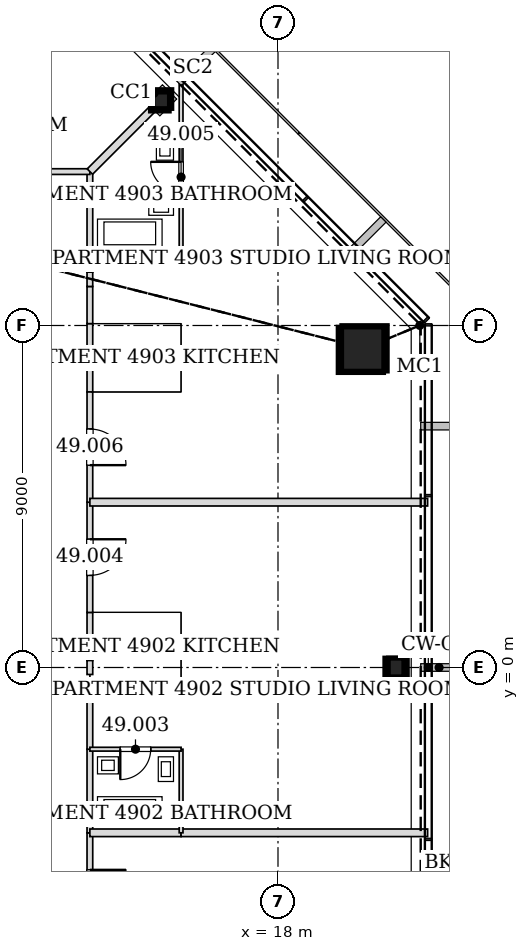
"""IFC4 building model, lengths in metres.
Left out: names, types, materials, properties, quantities, classifications, styles, units other than length and angle.
Written with IfcOpenShell. Run it as: python <this file> out.ifc"""

import sys

from ifc_helpers import new_model, si_unit, direction, frame, frame_2d, origin, origin_2d, place, context, subcontext, project, spatial, rectangle, hollow_rectangle, extrude, element, fill, save


model = new_model("IFC4")
c1 = context("Model", 3, precision=1e-05, world=origin(), true_north=direction((0.0, 1.0)))
c2 = subcontext(c1, "Body", "Model", "MODEL_VIEW")
j1 = project(units=[si_unit("LENGTHUNIT", "METRE"), si_unit("PLANEANGLEUNIT", "RADIAN")], contexts=[c1])
p1 = place(None, origin())
s1 = spatial("IfcSite", under=j1, at=p1, CompositionType="ELEMENT")
p2 = place(p1, origin())
s2 = spatial("IfcBuilding", under=s1, at=p2, CompositionType="ELEMENT")
p3 = place(p2, frame((0.0, 0.0, 214.2)))
s3 = spatial("IfcBuildingStorey", under=s2, at=p3, CompositionType="ELEMENT", Elevation=214.2)
p4 = place(p3, frame((20.277, 8.399, 0.0), z_axis=(-0.02827709807, -0.011770162649, 0.999530824435), x_axis=(0.3842825994, -0.923215513192, 0.0)))
e1 = element("IfcColumn", 1, at=p4, inside=s3, PredefinedType="COLUMN", context=c2, shape_type="SweptSolid", body=[
    extrude(hollow_rectangle(XDim=1.2, YDim=1.2, WallThickness=0.055, at=origin_2d()), origin(), (0.0, 0.0, 1.0), 3.402),
])
for number, where, z_axis, x_axis in (
    (2, (21.155, 0.0, 0.0), (-0.028, 0.0, 1.0), (0.0, -1.0, 0.0)),
    (3, (14.959, 14.959, 0.0), (-0.02, -0.02, 1.0), (0.707, -0.707, 0.0)),
):
    element("IfcColumn", number, at=place(p3, frame(where, z_axis=z_axis, x_axis=x_axis)), inside=s3, PredefinedType="COLUMN", context=c2, shape_type="SweptSolid", body=[
        extrude(hollow_rectangle(XDim=0.5, YDim=0.5, WallThickness=0.025, at=origin_2d()), origin(), (0.0, 0.0, 1.0), 3.402),
    ])
p5 = place(p3, frame((13.05, -7.251, 0.0), z_axis=(0.0, 0.0, 1.0), x_axis=(0.0, 1.0, 0.0)))
e4 = element("IfcWall", 4, at=p5, inside=s3, PredefinedType="PARTITIONING", context=c2, shape_type="SweptSolid", body=[
    extrude(rectangle(XDim=2.902, YDim=0.15, at=frame_2d((1.451, 0.0))), origin(), (0.0, 0.0, 1.0), 3.2),
])
p6 = place(p5, frame((0.976, 0.0, 0.0)))
e5 = element("IfcOpeningElement", 5, at=p6, cuts=e4, PredefinedType="OPENING", context=c2, shape_type="SweptSolid", body=[
    extrude(rectangle(XDim=0.95, YDim=2.1, at=frame_2d((0.475, 1.05))), frame((0.0, 0.085, 0.0), z_axis=(0.0, -1.0, 0.0), x_axis=(1.0, 0.0, 0.0)), (0.0, 0.0, 1.0), 0.17),
])
p7 = place(p3, frame((13.05, -4.351, 0.0), z_axis=(0.0, 0.0, 1.0), x_axis=(0.0, 1.0, 0.0)))
e6 = element("IfcWall", 6, at=p7, inside=s3, PredefinedType="PARTITIONING", context=c2, shape_type="SweptSolid", body=[
    extrude(rectangle(XDim=2.202, YDim=0.15, at=frame_2d((1.101, 0.0))), origin(), (0.0, 0.0, 1.0), 3.2),
])
p8 = place(p3, frame((13.05, 0.184, 0.0), z_axis=(0.0, 0.0, 1.0), x_axis=(0.0, 1.0, 0.0)))
e7 = element("IfcWall", 7, at=p8, inside=s3, PredefinedType="PARTITIONING", context=c2, shape_type="SweptSolid", body=[
    extrude(rectangle(XDim=1.267, YDim=0.15, at=frame_2d((0.634, 0.0))), origin(), (0.0, 0.0, 1.0), 3.2),
])
p9 = place(p3, frame((13.05, -0.184, 0.0), z_axis=(0.0, 0.0, 1.0), x_axis=(0.0, 1.0, 0.0)))
e8 = element("IfcWall", 8, at=p9, inside=s3, PredefinedType="PARTITIONING", context=c2, shape_type="SweptSolid", body=[
    extrude(rectangle(XDim=0.367, YDim=0.15, at=frame_2d((0.184, 0.0))), origin(), (0.0, 0.0, 1.0), 2.253),
])
p10 = place(p3, frame((13.05, -2.151, 0.0), z_axis=(0.0, 0.0, 1.0), x_axis=(0.0, 1.0, 0.0)))
e9 = element("IfcWall", 9, at=p10, inside=s3, PredefinedType="PARTITIONING", context=c2, shape_type="SweptSolid", body=[
    extrude(rectangle(XDim=1.802, YDim=0.15, at=frame_2d((0.901, 0.0))), origin(), (0.0, 0.0, 1.0), 3.2),
])
p11 = place(p3, frame((13.05, 1.449, 0.0), z_axis=(0.0, 0.0, 1.0), x_axis=(0.0, 1.0, 0.0)))
e10 = element("IfcWall", 10, at=p11, inside=s3, PredefinedType="PARTITIONING", context=c2, shape_type="SweptSolid", body=[
    extrude(rectangle(XDim=2.902, YDim=0.15, at=frame_2d((1.451, 0.0))), origin(), (0.0, 0.0, 1.0), 3.2),
])
p12 = place(p11, frame((0.976, 0.0, 0.0)))
e11 = element("IfcOpeningElement", 11, at=p12, cuts=e10, PredefinedType="OPENING", context=c2, shape_type="SweptSolid", body=[
    extrude(rectangle(XDim=0.95, YDim=2.1, at=frame_2d((0.475, 1.05))), frame((0.0, 0.085, 0.0), z_axis=(0.0, -1.0, 0.0), x_axis=(1.0, 0.0, 0.0)), (0.0, 0.0, 1.0), 0.17),
])
p13 = place(p3, frame((13.05, 10.849, 0.0), z_axis=(0.0, 0.0, 1.0), x_axis=(0.0, 1.0, 0.0)))
e12 = element("IfcWall", 12, at=p13, inside=s3, PredefinedType="PARTITIONING", context=c2, shape_type="SweptSolid", body=[
    extrude(rectangle(XDim=2.201, YDim=0.15, at=frame_2d((1.101, 0.0))), origin(), (0.0, 0.0, 1.0), 2.578),
])
p14 = place(p3, frame((13.05, 7.249, 0.0), z_axis=(0.0, 0.0, 1.0), x_axis=(0.0, 1.0, 0.0)))
e13 = element("IfcWall", 13, at=p14, inside=s3, PredefinedType="PARTITIONING", context=c2, shape_type="SweptSolid", body=[
    extrude(rectangle(XDim=1.802, YDim=0.15, at=frame_2d((0.901, 0.0))), origin(), (0.0, 0.0, 1.0), 3.2),
])
p15 = place(p3, frame((13.05, 4.349, 0.0), z_axis=(0.0, 0.0, 1.0), x_axis=(0.0, 1.0, 0.0)))
e14 = element("IfcWall", 14, at=p15, inside=s3, PredefinedType="PARTITIONING", context=c2, shape_type="SweptSolid", body=[
    extrude(rectangle(XDim=2.902, YDim=0.15, at=frame_2d((1.451, 0.0))), origin(), (0.0, 0.0, 1.0), 3.2),
])
p16 = place(p15, frame((0.976, 0.0, 0.0)))
e15 = element("IfcOpeningElement", 15, at=p16, cuts=e14, PredefinedType="OPENING", context=c2, shape_type="SweptSolid", body=[
    extrude(rectangle(XDim=0.95, YDim=2.1, at=frame_2d((0.475, 1.05))), frame((0.0, 0.085, 0.0), z_axis=(0.0, -1.0, 0.0), x_axis=(1.0, 0.0, 0.0)), (0.0, 0.0, 1.0), 0.17),
])
p17 = place(p3, frame((13.05, 9.049, 0.0), z_axis=(0.0, 0.0, 1.0), x_axis=(0.0, 1.0, 0.0)))
e16 = element("IfcWall", 16, at=p17, inside=s3, PredefinedType="PARTITIONING", context=c2, shape_type="SweptSolid", body=[
    extrude(rectangle(XDim=0.978, YDim=0.15, at=frame_2d((0.489, 0.0))), origin(), (0.0, 0.0, 1.0), 3.2),
])
p18 = place(p3, frame((13.05, 10.404, 0.0), z_axis=(0.0, 0.0, 1.0), x_axis=(0.0, 1.0, 0.0)))
e17 = element("IfcWall", 17, at=p18, inside=s3, PredefinedType="PARTITIONING", context=c2, shape_type="SweptSolid", body=[
    extrude(rectangle(XDim=0.447, YDim=0.15, at=frame_2d((0.224, 0.0))), origin(), (0.0, 0.0, 1.0), 3.2),
])
p19 = place(p3, frame((13.05, 10.027, 0.0), z_axis=(0.0, 0.0, 1.0), x_axis=(0.0, 1.0, 0.0)))
e18 = element("IfcWall", 18, at=p19, inside=s3, PredefinedType="PARTITIONING", context=c2, shape_type="SweptSolid", body=[
    extrude(rectangle(XDim=0.377, YDim=0.15, at=frame_2d((0.188, 0.0))), origin(), (0.0, 0.0, 1.0), 2.268),
])
p20 = place(p3, frame((13.05, 13.05, 0.0), z_axis=(0.0, 0.0, 1.0), x_axis=(-1.0, 0.0, 0.0)))
e19 = element("IfcWall", 19, at=p20, inside=s3, PredefinedType="PARTITIONING", context=c2, shape_type="SweptSolid", body=[
    extrude(rectangle(XDim=2.646, YDim=0.15, at=frame_2d((1.323, 0.0))), origin(), (0.0, 0.0, 1.0), 2.578),
])
p21 = place(p3, frame((15.451, -4.35, 0.0), z_axis=(0.0, 0.0, 1.0), x_axis=(-1.0, 0.0, 0.0)))
e20 = element("IfcWall", 20, at=p21, inside=s3, PredefinedType="PARTITIONING", context=c2, shape_type="SweptSolid", body=[
    extrude(rectangle(XDim=2.401, YDim=0.2, at=frame_2d((1.2, 0.0))), origin(), (0.0, 0.0, 1.0), 2.591),
])
p22 = place(p3, frame((21.937, -4.35, 0.0), z_axis=(0.0, 0.0, 1.0), x_axis=(-1.0, 0.0, 0.0)))
e21 = element("IfcWall", 21, at=p22, inside=s3, PredefinedType="PARTITIONING", context=c2, shape_type="SweptSolid", body=[
    extrude(rectangle(XDim=6.488, YDim=0.2, at=frame_2d((3.244, 0.0))), origin(), (0.0, 0.0, 1.0), 2.591),
])
p23 = place(p3, frame((15.45, -4.35, 0.0), z_axis=(0.0, 0.0, 1.0), x_axis=(0.0, 1.0, 0.0)))
e22 = element("IfcWall", 22, at=p23, inside=s3, PredefinedType="PARTITIONING", context=c2, shape_type="SweptSolid", body=[
    extrude(rectangle(XDim=2.2, YDim=0.1, at=frame_2d((1.1, 0.0))), origin(), (0.0, 0.0, 1.0), 3.2),
])
p24 = place(p3, frame((15.45, -2.15, 0.0), z_axis=(0.0, 0.0, 1.0), x_axis=(-1.0, 0.0, 0.0)))
e23 = element("IfcWall", 23, at=p24, inside=s3, PredefinedType="PARTITIONING", context=c2, shape_type="SweptSolid", body=[
    extrude(rectangle(XDim=2.4, YDim=0.1, at=frame_2d((1.2, 0.0))), origin(), (0.0, 0.0, 1.0), 2.591),
])
p25 = place(p24, frame((0.8, 0.0, 0.0)))
e24 = element("IfcOpeningElement", 24, at=p25, cuts=e23, PredefinedType="OPENING", context=c2, shape_type="SweptSolid", body=[
    extrude(rectangle(XDim=0.8, YDim=2.1, at=frame_2d((0.4, 1.05))), frame((0.0, 0.06, 0.0), z_axis=(0.0, -1.0, 0.0), x_axis=(1.0, 0.0, 0.0)), (0.0, 0.0, 1.0), 0.12),
])
p26 = place(p3, frame((21.937, 4.35, 0.0), z_axis=(0.0, 0.0, 1.0), x_axis=(-1.0, 0.0, 0.0)))
e25 = element("IfcWall", 25, at=p26, inside=s3, PredefinedType="PARTITIONING", context=c2, shape_type="SweptSolid", body=[
    extrude(rectangle(XDim=8.887, YDim=0.2, at=frame_2d((4.444, 0.0))), origin(), (0.0, 0.0, 1.0), 2.591),
])
p27 = place(p3, frame((13.05, 10.85, 0.0), z_axis=(0.0, 0.0, 1.0), x_axis=(1.0, 0.0, 0.0)))
e26 = element("IfcWall", 26, at=p27, inside=s3, PredefinedType="PARTITIONING", context=c2, shape_type="SweptSolid", body=[
    extrude(rectangle(XDim=2.4, YDim=0.1, at=frame_2d((1.2, 0.0))), origin(), (0.0, 0.0, 1.0), 2.74),
])
p28 = place(p3, frame((15.45, 10.85, 0.0), z_axis=(0.0, 0.0, 1.0), x_axis=(0.0, 1.0, 0.0)))
e27 = element("IfcWall", 27, at=p28, inside=s3, PredefinedType="PARTITIONING", context=c2, shape_type="SweptSolid", body=[
    extrude(rectangle(XDim=4.617, YDim=0.1, at=frame_2d((2.309, 0.0))), origin(), (0.0, 0.0, 1.0), 2.784),
])
p29 = place(p28, frame((1.656, 0.0, 0.0)))
e28 = element("IfcOpeningElement", 28, at=p29, cuts=e27, PredefinedType="OPENING", context=c2, shape_type="SweptSolid", body=[
    extrude(rectangle(XDim=0.8, YDim=2.1, at=frame_2d((0.4, 1.05))), frame((0.0, 0.06, 0.0), z_axis=(0.0, -1.0, 0.0), x_axis=(1.0, 0.0, 0.0)), (0.0, 0.0, 1.0), 0.12),
])
p30 = place(p3, frame((14.701, 14.701, 0.0), z_axis=(0.0, 0.0, 1.0), x_axis=(-0.707106781187, -0.707106781187, 0.0)))
e29 = element("IfcWall", 29, at=p30, inside=s3, PredefinedType="PARTITIONING", context=c2, shape_type="SweptSolid", body=[
    extrude(rectangle(XDim=2.334, YDim=0.2, at=frame_2d((1.167, 0.0))), origin(), (0.0, 0.0, 1.0), 2.578),
])
p31 = place(p6, frame((0.95, 0.0, 0.0), z_axis=(0.0, 0.0, 1.0), x_axis=(-1.0, 0.0, 0.0)))
e30 = element("IfcDoor", 30, at=p31, inside=s3, OperationType="SINGLE_SWING_LEFT", PredefinedType="DOOR", context=c2, shape_type="SweptSolid", body=[
    extrude(rectangle(XDim=0.95, YDim=2.1, at=frame_2d((0.475, 1.05))), frame((0.0, 0.025, 0.0), z_axis=(0.0, -1.0, 0.0), x_axis=(1.0, 0.0, 0.0)), (0.0, 0.0, 1.0), 0.05),
])
fill(e5, e30)
p32 = place(p25, origin())
e31 = element("IfcDoor", 31, at=p32, inside=s3, OperationType="SINGLE_SWING_RIGHT", PredefinedType="DOOR", context=c2, shape_type="SweptSolid", body=[
    extrude(rectangle(XDim=0.8, YDim=2.1, at=frame_2d((0.4, 1.05))), frame((0.0, 0.025, 0.0), z_axis=(0.0, -1.0, 0.0), x_axis=(1.0, 0.0, 0.0)), (0.0, 0.0, 1.0), 0.05),
])
fill(e24, e31)
p33 = place(p12, frame((0.95, 0.0, 0.0), z_axis=(0.0, 0.0, 1.0), x_axis=(-1.0, 0.0, 0.0)))
e32 = element("IfcDoor", 32, at=p33, inside=s3, OperationType="SINGLE_SWING_LEFT", PredefinedType="DOOR", context=c2, shape_type="SweptSolid", body=[
    extrude(rectangle(XDim=0.95, YDim=2.1, at=frame_2d((0.475, 1.05))), frame((0.0, 0.025, 0.0), z_axis=(0.0, -1.0, 0.0), x_axis=(1.0, 0.0, 0.0)), (0.0, 0.0, 1.0), 0.05),
])
fill(e11, e32)
p34 = place(p29, origin())
e33 = element("IfcDoor", 33, at=p34, inside=s3, OperationType="SINGLE_SWING_RIGHT", PredefinedType="DOOR", context=c2, shape_type="SweptSolid", body=[
    extrude(rectangle(XDim=0.8, YDim=2.1, at=frame_2d((0.4, 1.05))), frame((0.0, 0.025, 0.0), z_axis=(0.0, -1.0, 0.0), x_axis=(1.0, 0.0, 0.0)), (0.0, 0.0, 1.0), 0.05),
])
fill(e28, e33)
p35 = place(p16, frame((0.95, 0.0, 0.0), z_axis=(0.0, 0.0, 1.0), x_axis=(-1.0, 0.0, 0.0)))
e34 = element("IfcDoor", 34, at=p35, inside=s3, OperationType="SINGLE_SWING_RIGHT", PredefinedType="DOOR", context=c2, shape_type="SweptSolid", body=[
    extrude(rectangle(XDim=0.95, YDim=2.1, at=frame_2d((0.475, 1.05))), frame((0.0, 0.025, 0.0), z_axis=(0.0, -1.0, 0.0), x_axis=(1.0, 0.0, 0.0)), (0.0, 0.0, 1.0), 0.05),
])
fill(e15, e34)
save(model, sys.argv[1])
